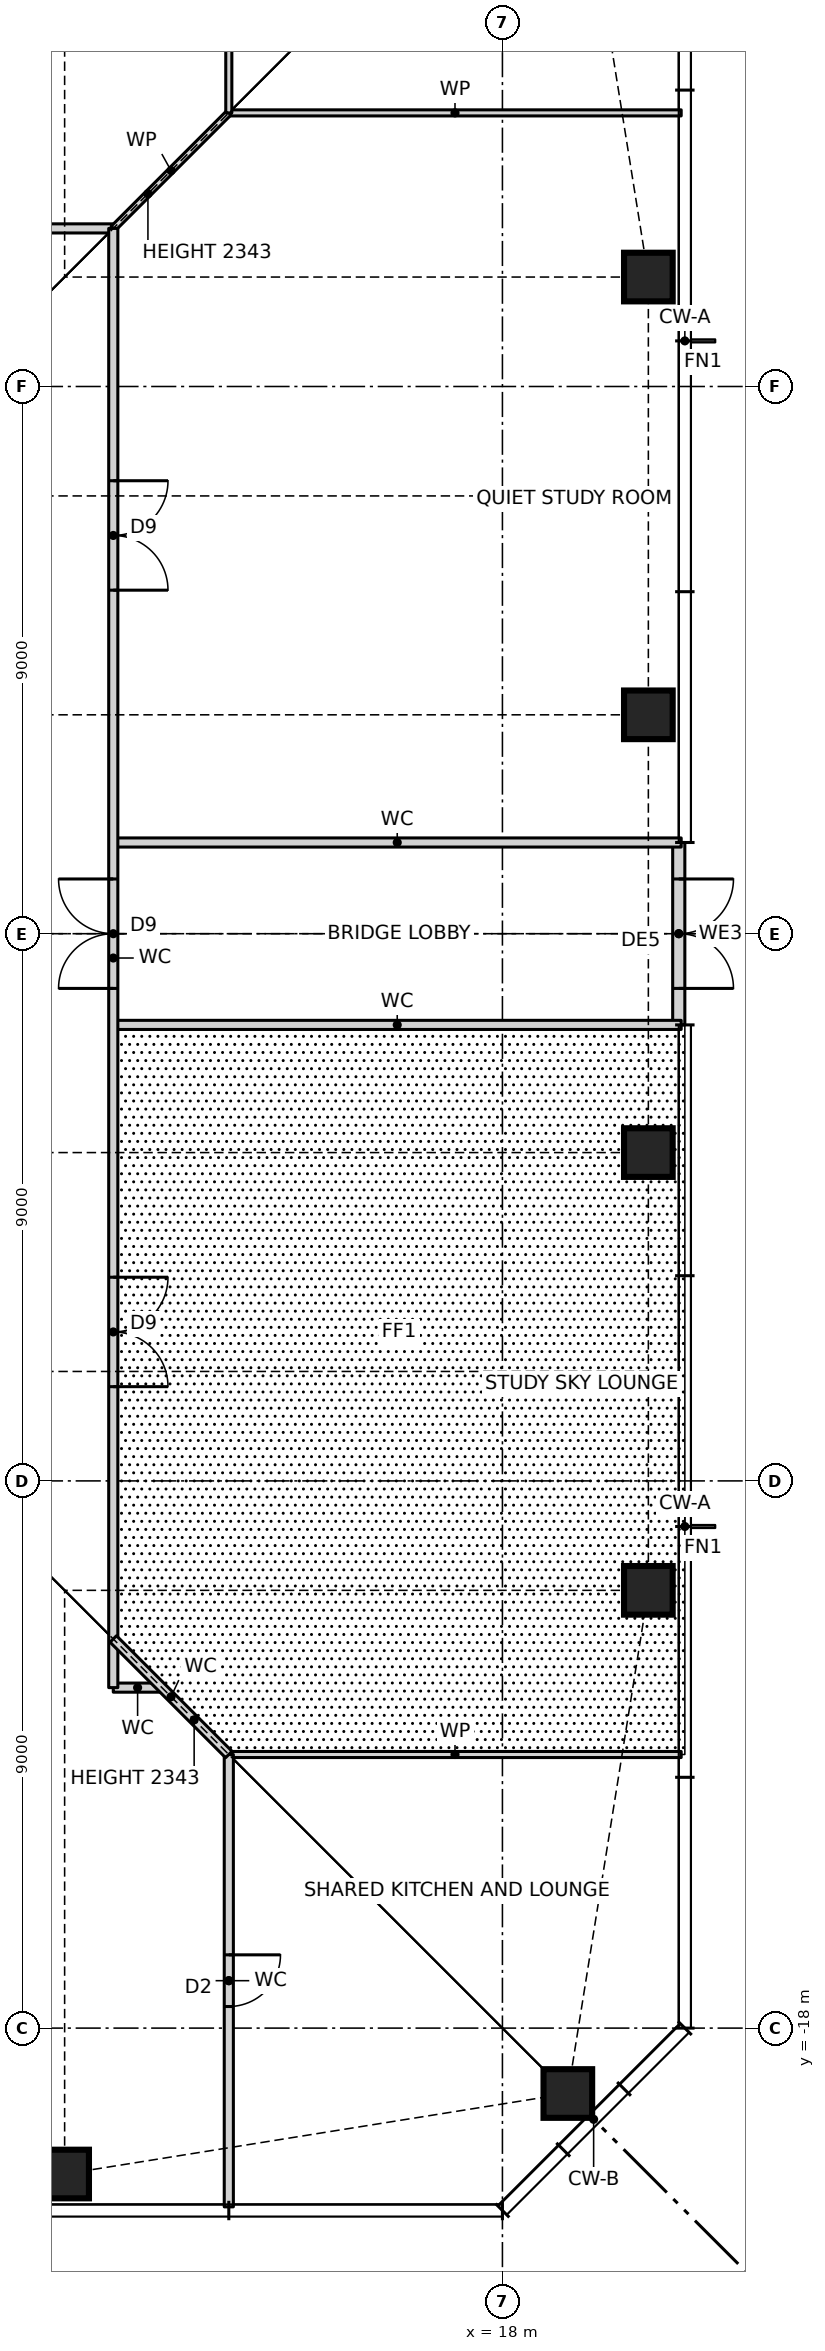
"""IFC4 building model, lengths in metres.
Left out: names, types, materials, properties, quantities, classifications, styles, units other than length and angle.
Written with IfcOpenShell. Run it as: python <this file> out.ifc"""

import sys

from ifc_helpers import new_model, si_unit, direction, frame, frame_2d, origin, origin_2d, place, context, subcontext, project, spatial, rectangle, hollow_rectangle, extrude, element, fill, save


model = new_model("IFC4")
c1 = context("Model", 3, precision=1e-05, world=origin(), true_north=direction((0.0, 1.0)))
c2 = subcontext(c1, "Body", "Model", "MODEL_VIEW")
j1 = project(units=[si_unit("LENGTHUNIT", "METRE"), si_unit("PLANEANGLEUNIT", "RADIAN")], contexts=[c1])
p1 = place(None, origin())
s1 = spatial("IfcSite", under=j1, at=p1, CompositionType="ELEMENT")
p2 = place(p1, origin())
s2 = spatial("IfcBuilding", under=s1, at=p2, CompositionType="ELEMENT")
p3 = place(p2, frame((0.0, 0.0, 129.5)))
s3 = spatial("IfcBuildingStorey", under=s2, at=p3, CompositionType="ELEMENT", Elevation=129.5)
for number, where, z_axis, x_axis in (
    (1, (10.8, -20.4, 0.0), (0.0, 0.0, 1.0), (1.0, 0.0, 0.0)),
    (2, (19.076, -19.076, 0.0), (0.0, 0.0, 1.0), (1.0, 0.0, 0.0)),
    (3, (20.4, -10.8, 0.0), (0.0, 0.0, 1.0), (1.0, 0.0, 0.0)),
    (4, (20.4, -3.6, 0.0), (0.0, 0.0, 1.0), (1.0, 0.0, 0.0)),
    (5, (20.4, 3.6, 0.0), (0.0, 0.0, 1.0), (1.0, 0.0, 0.0)),
    (6, (20.4, 10.8, 0.0), (0.0, 0.0, 1.0), (1.0, 0.0, 0.0)),
):
    element("IfcColumn", number, at=place(p3, frame(where, z_axis=z_axis, x_axis=x_axis)), inside=s3, PredefinedType="COLUMN", context=c2, shape_type="SweptSolid", body=[
        extrude(hollow_rectangle(XDim=0.8, YDim=0.8, WallThickness=0.07, at=origin_2d()), origin(), (0.0, 0.0, 1.0), 3.5),
    ])
p4 = place(p3, frame((20.9, -1.5, 0.0), z_axis=(0.0, 0.0, 1.0), x_axis=(0.0, 1.0, 0.0)))
e7 = element("IfcWall", 7, at=p4, inside=s3, PredefinedType="SOLIDWALL", context=c2, shape_type="SweptSolid", body=[
    extrude(rectangle(XDim=3.0, YDim=0.2, at=frame_2d((1.5, 0.0))), origin(), (0.0, 0.0, 1.0), 3.27),
])
p5 = place(p4, frame((0.6, 0.0, 0.0)))
e8 = element("IfcOpeningElement", 8, at=p5, cuts=e7, PredefinedType="OPENING", context=c2, shape_type="SweptSolid", body=[
    extrude(rectangle(XDim=1.8, YDim=2.4, at=frame_2d((0.9, 1.2))), frame((0.0, 0.11, 0.0), z_axis=(0.0, -1.0, 0.0), x_axis=(1.0, 0.0, 0.0)), (0.0, 0.0, 1.0), 0.22),
])
p6 = place(p3, frame((13.5, -13.5, 0.0), z_axis=(0.0, 0.0, 1.0), x_axis=(1.0, 0.0, 0.0)))
e9 = element("IfcWall", 9, at=p6, inside=s3, PredefinedType="PARTITIONING", context=c2, shape_type="SweptSolid", body=[
    extrude(rectangle(XDim=7.44, YDim=0.1, at=frame_2d((3.72, 0.0))), origin(), (0.0, 0.0, 1.0), 3.27),
])
p7 = place(p3, frame((11.6, -12.4, 0.0), z_axis=(0.0, 0.0, 1.0), x_axis=(1.0, 0.0, 0.0)))
e10 = element("IfcWall", 10, at=p7, inside=s3, PredefinedType="PARTITIONING", context=c2, shape_type="SweptSolid", body=[
    extrude(rectangle(XDim=0.8, YDim=0.15, at=frame_2d((0.4, 0.0))), origin(), (0.0, 0.0, 1.0), 3.27),
])
for number, where, z_axis, x_axis in (
    (11, (11.6, -1.5, 0.0), (0.0, 0.0, 1.0), (1.0, 0.0, 0.0)),
    (12, (11.6, 1.5, 0.0), (0.0, 0.0, 1.0), (1.0, 0.0, 0.0)),
):
    element("IfcWall", number, at=place(p3, frame(where, z_axis=z_axis, x_axis=x_axis)), inside=s3, PredefinedType="PARTITIONING", context=c2, shape_type="SweptSolid", body=[
        extrude(rectangle(XDim=9.34, YDim=0.15, at=frame_2d((4.67, 0.0))), origin(), (0.0, 0.0, 1.0), 3.27),
    ])
p8 = place(p3, frame((-9.0, 11.6, 0.0), z_axis=(0.0, 0.0, 1.0), x_axis=(1.0, 0.0, 0.0)))
e13 = element("IfcWall", 13, at=p8, inside=s3, PredefinedType="PARTITIONING", context=c2, shape_type="SweptSolid", body=[
    extrude(rectangle(XDim=20.6, YDim=0.15, at=frame_2d((10.3, 0.0))), origin(), (0.0, 0.0, 1.0), 3.27),
])
p9 = place(p8, frame((15.7, 0.0, 0.0)))
e14 = element("IfcOpeningElement", 14, at=p9, cuts=e13, PredefinedType="OPENING", context=c2, shape_type="SweptSolid", body=[
    extrude(rectangle(XDim=1.0, YDim=2.1, at=frame_2d((0.5, 1.05))), frame((0.0, 0.085, 0.0), z_axis=(0.0, -1.0, 0.0), x_axis=(1.0, 0.0, 0.0)), (0.0, 0.0, 1.0), 0.17),
])
p10 = place(p3, frame((13.5, 13.5, 0.0), z_axis=(0.0, 0.0, 1.0), x_axis=(1.0, 0.0, 0.0)))
e15 = element("IfcWall", 15, at=p10, inside=s3, PredefinedType="PARTITIONING", context=c2, shape_type="SweptSolid", body=[
    extrude(rectangle(XDim=7.44, YDim=0.1, at=frame_2d((3.72, 0.0))), origin(), (0.0, 0.0, 1.0), 3.27),
])
p11 = place(p3, frame((11.6, 11.6, 0.0), z_axis=(0.0, 0.0, 1.0), x_axis=(0.707106781187, 0.707106781187, 0.0)))
e16 = element("IfcWall", 16, at=p11, inside=s3, PredefinedType="PARTITIONING", context=c2, shape_type="SweptSolid", body=[
    extrude(rectangle(XDim=2.687, YDim=0.1, at=frame_2d((1.343, 0.0))), origin(), (0.0, 0.0, 1.0), 2.343),
])
p12 = place(p3, frame((13.5, -20.94, 0.0), z_axis=(0.0, 0.0, 1.0), x_axis=(0.0, 1.0, 0.0)))
e17 = element("IfcWall", 17, at=p12, inside=s3, PredefinedType="PARTITIONING", context=c2, shape_type="SweptSolid", body=[
    extrude(rectangle(XDim=7.44, YDim=0.15, at=frame_2d((3.72, 0.0))), origin(), (0.0, 0.0, 1.0), 3.27),
])
p13 = place(p12, frame((3.295, 0.0, 0.0)))
e18 = element("IfcOpeningElement", 18, at=p13, cuts=e17, PredefinedType="OPENING", context=c2, shape_type="SweptSolid", body=[
    extrude(rectangle(XDim=0.85, YDim=2.1, at=frame_2d((0.425, 1.05))), frame((0.0, 0.085, 0.0), z_axis=(0.0, -1.0, 0.0), x_axis=(1.0, 0.0, 0.0)), (0.0, 0.0, 1.0), 0.17),
])
p14 = place(p3, frame((13.5, 13.5, 0.0), z_axis=(0.0, 0.0, 1.0), x_axis=(0.0, 1.0, 0.0)))
e19 = element("IfcWall", 19, at=p14, inside=s3, PredefinedType="PARTITIONING", context=c2, shape_type="SweptSolid", body=[
    extrude(rectangle(XDim=7.44, YDim=0.1, at=frame_2d((3.72, 0.0))), origin(), (0.0, 0.0, 1.0), 3.27),
])
p15 = place(p14, frame((1.275, 0.0, 0.0)))
e20 = element("IfcOpeningElement", 20, at=p15, cuts=e19, PredefinedType="OPENING", context=c2, shape_type="SweptSolid", body=[
    extrude(rectangle(XDim=0.85, YDim=2.1, at=frame_2d((0.425, 1.05))), frame((0.0, 0.06, 0.0), z_axis=(0.0, -1.0, 0.0), x_axis=(1.0, 0.0, 0.0)), (0.0, 0.0, 1.0), 0.12),
])
p16 = place(p3, frame((11.6, -12.4, 0.0), z_axis=(0.0, 0.0, 1.0), x_axis=(0.0, 1.0, 0.0)))
e21 = element("IfcWall", 21, at=p16, inside=s3, PredefinedType="PARTITIONING", context=c2, shape_type="SweptSolid", body=[
    extrude(rectangle(XDim=24.0, YDim=0.15, at=frame_2d((12.0, 0.0))), origin(), (0.0, 0.0, 1.0), 3.27),
])
p17 = place(p16, frame((4.95, 0.0, 0.0)))
e22 = element("IfcOpeningElement", 22, at=p17, cuts=e21, PredefinedType="OPENING", context=c2, shape_type="SweptSolid", body=[
    extrude(rectangle(XDim=1.8, YDim=2.1, at=frame_2d((0.9, 1.05))), frame((0.0, 0.085, 0.0), z_axis=(0.0, -1.0, 0.0), x_axis=(1.0, 0.0, 0.0)), (0.0, 0.0, 1.0), 0.17),
])
p18 = place(p16, frame((11.5, 0.0, 0.0)))
e23 = element("IfcOpeningElement", 23, at=p18, cuts=e21, PredefinedType="OPENING", context=c2, shape_type="SweptSolid", body=[
    extrude(rectangle(XDim=1.8, YDim=2.1, at=frame_2d((0.9, 1.05))), frame((0.0, 0.085, 0.0), z_axis=(0.0, -1.0, 0.0), x_axis=(1.0, 0.0, 0.0)), (0.0, 0.0, 1.0), 0.17),
])
p19 = place(p16, frame((18.05, 0.0, 0.0)))
e24 = element("IfcOpeningElement", 24, at=p19, cuts=e21, PredefinedType="OPENING", context=c2, shape_type="SweptSolid", body=[
    extrude(rectangle(XDim=1.8, YDim=2.1, at=frame_2d((0.9, 1.05))), frame((0.0, 0.085, 0.0), z_axis=(0.0, -1.0, 0.0), x_axis=(1.0, 0.0, 0.0)), (0.0, 0.0, 1.0), 0.17),
])
p20 = place(p3, frame((13.5, -13.5, 0.0), z_axis=(0.0, 0.0, 1.0), x_axis=(-0.707106781187, 0.707106781187, 0.0)))
e25 = element("IfcWall", 25, at=p20, inside=s3, PredefinedType="PARTITIONING", context=c2, shape_type="SweptSolid", body=[
    extrude(rectangle(XDim=2.687, YDim=0.15, at=frame_2d((1.343, 0.0))), origin(), (0.0, 0.0, 1.0), 2.343),
])
p21 = place(p5, frame((1.8, 0.0, 0.0), z_axis=(0.0, 0.0, 1.0), x_axis=(-1.0, 0.0, 0.0)))
e26 = element("IfcDoor", 26, at=p21, inside=s3, OperationType="DOUBLE_DOOR_SINGLE_SWING", PredefinedType="DOOR", context=c2, shape_type="SweptSolid", body=[
    extrude(rectangle(XDim=1.8, YDim=2.4, at=frame_2d((0.9, 1.2))), frame((0.0, 0.025, 0.0), z_axis=(0.0, -1.0, 0.0), x_axis=(1.0, 0.0, 0.0)), (0.0, 0.0, 1.0), 0.05),
])
fill(e8, e26)
p22 = place(p17, frame((1.8, 0.0, 0.0), z_axis=(0.0, 0.0, 1.0), x_axis=(-1.0, 0.0, 0.0)))
e27 = element("IfcDoor", 27, at=p22, inside=s3, OperationType="DOUBLE_DOOR_SINGLE_SWING", PredefinedType="DOOR", context=c2, shape_type="SweptSolid", body=[
    extrude(rectangle(XDim=1.8, YDim=2.1, at=frame_2d((0.9, 1.05))), frame((0.0, 0.025, 0.0), z_axis=(0.0, -1.0, 0.0), x_axis=(1.0, 0.0, 0.0)), (0.0, 0.0, 1.0), 0.05),
])
fill(e22, e27)
p23 = place(p18, origin())
e28 = element("IfcDoor", 28, at=p23, inside=s3, OperationType="DOUBLE_DOOR_SINGLE_SWING", PredefinedType="DOOR", context=c2, shape_type="SweptSolid", body=[
    extrude(rectangle(XDim=1.8, YDim=2.1, at=frame_2d((0.9, 1.05))), frame((0.0, 0.025, 0.0), z_axis=(0.0, -1.0, 0.0), x_axis=(1.0, 0.0, 0.0)), (0.0, 0.0, 1.0), 0.05),
])
fill(e23, e28)
p24 = place(p19, frame((1.8, 0.0, 0.0), z_axis=(0.0, 0.0, 1.0), x_axis=(-1.0, 0.0, 0.0)))
e29 = element("IfcDoor", 29, at=p24, inside=s3, OperationType="DOUBLE_DOOR_SINGLE_SWING", PredefinedType="DOOR", context=c2, shape_type="SweptSolid", body=[
    extrude(rectangle(XDim=1.8, YDim=2.1, at=frame_2d((0.9, 1.05))), frame((0.0, 0.025, 0.0), z_axis=(0.0, -1.0, 0.0), x_axis=(1.0, 0.0, 0.0)), (0.0, 0.0, 1.0), 0.05),
])
fill(e24, e29)
p25 = place(p13, frame((0.85, 0.0, 0.0), z_axis=(0.0, 0.0, 1.0), x_axis=(-1.0, 0.0, 0.0)))
e30 = element("IfcDoor", 30, at=p25, inside=s3, OperationType="SINGLE_SWING_LEFT", PredefinedType="DOOR", context=c2, shape_type="SweptSolid", body=[
    extrude(rectangle(XDim=0.85, YDim=2.1, at=frame_2d((0.425, 1.05))), frame((0.0, 0.025, 0.0), z_axis=(0.0, -1.0, 0.0), x_axis=(1.0, 0.0, 0.0)), (0.0, 0.0, 1.0), 0.05),
])
fill(e18, e30)
save(model, sys.argv[1])
